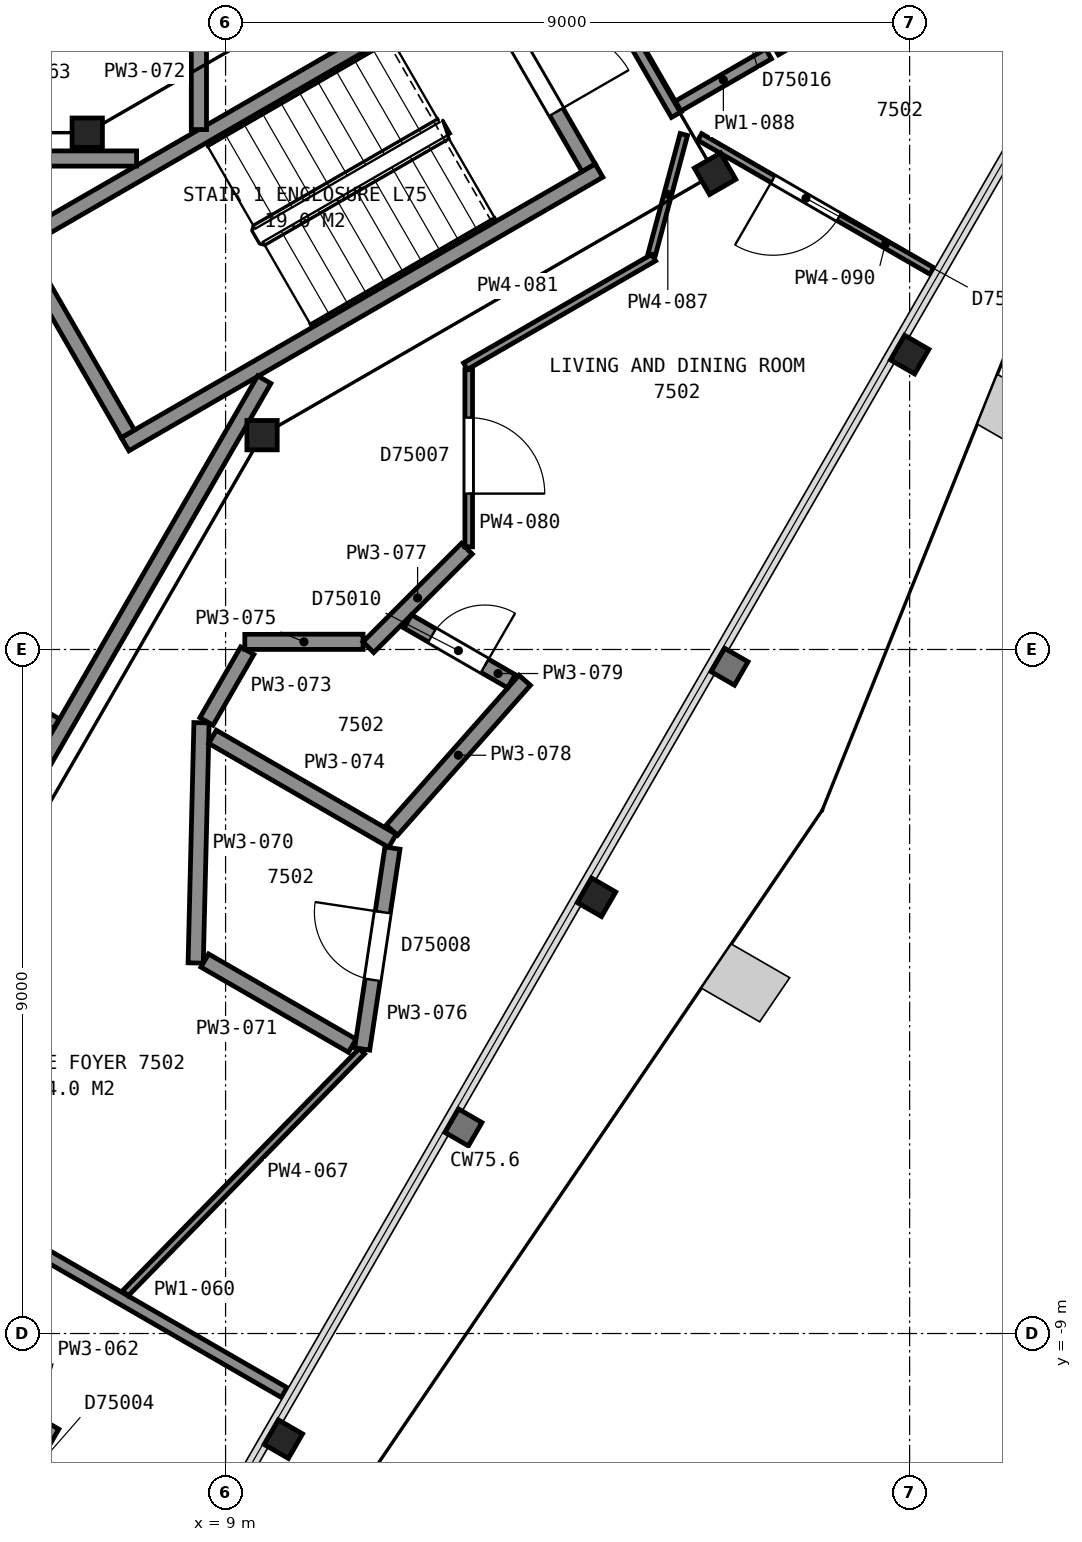
"""IFC4 building model, lengths in metres.
Left out: names, types, materials, properties, quantities, classifications, styles, units other than length and angle.
Written with IfcOpenShell. Run it as: python <this file> out.ifc"""

import sys

from ifc_helpers import new_model, si_unit, direction, frame, frame_2d, origin, origin_2d, place, context, subcontext, project, spatial, rectangle, i_section, extrude, element, fill, save


model = new_model("IFC4")
c1 = context("Model", 3, precision=1e-05, world=origin(), true_north=direction((0.0, 1.0)))
c2 = subcontext(c1, "Body", "Model", "MODEL_VIEW")
j1 = project(units=[si_unit("LENGTHUNIT", "METRE"), si_unit("PLANEANGLEUNIT", "RADIAN")], contexts=[c1])
p1 = place(None, origin())
s1 = spatial("IfcSite", under=j1, at=p1, CompositionType="ELEMENT")
p2 = place(p1, origin())
s2 = spatial("IfcBuilding", under=s1, at=p2, CompositionType="ELEMENT")
p3 = place(p2, frame((0.0, 0.0, 297.3)))
s3 = spatial("IfcBuildingStorey", under=s2, at=p3, CompositionType="ELEMENT", Elevation=297.3)
for number, where, z_axis, x_axis in (
    (1, (9.76, -10.39, 0.0), (0.0, 0.0, 1.0), (-0.5, -0.866, 0.0)),
    (2, (13.88, -3.26, 0.0), (0.0, 0.0, 1.0), (-0.5, -0.866, 0.0)),
    (3, (18.0, 3.88, 0.0), (0.0, 0.0, 1.0), (-0.5, -0.866, 0.0)),
):
    element("IfcColumn", number, at=place(p3, frame(where, z_axis=z_axis, x_axis=x_axis)), inside=s3, PredefinedType="COLUMN", context=c2, shape_type="SweptSolid", body=[
        extrude(i_section(OverallWidth=0.373, OverallDepth=0.368, WebThickness=0.015, FlangeThickness=0.024, FilletRadius=0.015, at=origin_2d()), origin(), (0.0, 0.0, 1.0), 3.7),
    ])
p4 = place(p3, frame((9.48, 2.82, 0.0), z_axis=(0.0, 0.0, 1.0), x_axis=(1.0, 0.0, 0.0)))
e4 = element("IfcColumn", 4, at=p4, inside=s3, PredefinedType="COLUMN", context=c2, shape_type="SweptSolid", body=[
    extrude(i_section(OverallWidth=0.399, OverallDepth=0.386, WebThickness=0.021, FlangeThickness=0.033, FilletRadius=0.015, at=origin_2d()), origin(), (0.0, 0.0, 1.0), 3.7),
])
p5 = place(p3, frame((15.44, 6.26, 0.0), z_axis=(0.0, 0.0, 1.0), x_axis=(0.5, -0.866025403784, 0.0)))
e5 = element("IfcColumn", 5, at=p5, inside=s3, PredefinedType="COLUMN", context=c2, shape_type="SweptSolid", body=[
    extrude(i_section(OverallWidth=0.401, OverallDepth=0.399, WebThickness=0.025, FlangeThickness=0.04, FilletRadius=0.015, at=origin_2d()), origin(), (0.0, 0.0, 1.0), 3.7),
])
p6 = place(p3, frame((7.18, 6.8, 0.0), z_axis=(0.0, 0.0, 1.0), x_axis=(1.0, 0.0, 0.0)))
e6 = element("IfcColumn", 6, at=p6, inside=s3, PredefinedType="COLUMN", context=c2, shape_type="SweptSolid", body=[
    extrude(i_section(OverallWidth=0.399, OverallDepth=0.386, WebThickness=0.021, FlangeThickness=0.033, FilletRadius=0.015, at=origin_2d()), origin(), (0.0, 0.0, 1.0), 3.7),
])
p7 = place(p3, frame((13.777, 6.338, 0.0), z_axis=(0.0, 0.0, 1.0), x_axis=(-0.500049511043, 0.865996816683, 0.0)))
e7 = element("IfcWall", 7, at=p7, inside=s3, PredefinedType="PARTITIONING", context=c2, shape_type="SweptSolid", body=[
    extrude(rectangle(XDim=2.8, YDim=0.2, at=frame_2d((1.4, 0.0))), origin(), (0.0, 0.0, 1.0), 3.45),
])
p8 = place(p7, frame((0.85, 0.0, 0.0)))
e8 = element("IfcOpeningElement", 8, at=p8, cuts=e7, PredefinedType="OPENING", context=c2, shape_type="SweptSolid", body=[
    extrude(rectangle(XDim=1.1, YDim=2.1, at=frame_2d((0.55, 1.05))), frame((0.0, 0.11, 0.0), z_axis=(0.0, -1.0, 0.0), x_axis=(1.0, 0.0, 0.0)), (0.0, 0.0, 1.0), 0.22),
])
for number, where, z_axis, x_axis in (
    (9, (6.178, 5.299, 0.0), (0.0, 0.0, 1.0), (0.866, 0.5, 0.0)),
    (10, (7.678, 2.701, 0.0), (0.0, 0.0, 1.0), (0.866, 0.5, 0.0)),
):
    element("IfcWall", number, at=place(p3, frame(where, z_axis=z_axis, x_axis=x_axis)), inside=s3, PredefinedType="PARTITIONING", context=c2, shape_type="SweptSolid", body=[
        extrude(rectangle(XDim=7.2, YDim=0.2, at=frame_2d((3.6, 0.0))), origin(), (0.0, 0.0, 1.0), 3.45),
    ])
p9 = place(p3, frame((7.715, 2.838, 0.0), z_axis=(0.0, 0.0, 1.0), x_axis=(-0.500049511043, 0.865996816683, 0.0)))
e11 = element("IfcWall", 11, at=p9, inside=s3, PredefinedType="PARTITIONING", context=c2, shape_type="SweptSolid", body=[
    extrude(rectangle(XDim=2.8, YDim=0.2, at=frame_2d((1.4, 0.0))), origin(), (0.0, 0.0, 1.0), 3.45),
])
p10 = place(p3, frame((7.829, 6.46, 0.0), z_axis=(0.0, 0.0, 1.0), x_axis=(-1.0, 0.0, 0.0)))
e12 = element("IfcWall", 12, at=p10, inside=s3, PredefinedType="PARTITIONING", context=c2, shape_type="SweptSolid", body=[
    extrude(rectangle(XDim=15.658, YDim=0.2, at=frame_2d((7.829, 0.0))), origin(), (0.0, 0.0, 1.0), 3.45),
])
p11 = place(p10, frame((12.168, 0.0, 0.0)))
e13 = element("IfcOpeningElement", 13, at=p11, cuts=e12, PredefinedType="OPENING", context=c2, shape_type="SweptSolid", body=[
    extrude(rectangle(XDim=1.2, YDim=2.1, at=frame_2d((0.6, 1.05))), frame((0.0, 0.11, 0.0), z_axis=(0.0, -1.0, 0.0), x_axis=(1.0, 0.0, 0.0)), (0.0, 0.0, 1.0), 0.22),
])
p12 = place(p3, frame((3.828, -6.29, 0.0), z_axis=(0.0, 0.0, 1.0), x_axis=(0.499979739078, 0.866037101117, 0.0)))
e14 = element("IfcWall", 14, at=p12, inside=s3, PredefinedType="PARTITIONING", context=c2, shape_type="SweptSolid", body=[
    extrude(rectangle(XDim=11.363, YDim=0.2, at=frame_2d((5.681, 0.0))), origin(), (0.0, 0.0, 1.0), 3.45),
])
p13 = place(p12, frame((0.55, 0.0, 0.0)))
e15 = element("IfcOpeningElement", 15, at=p13, cuts=e14, PredefinedType="OPENING", context=c2, shape_type="SweptSolid", body=[
    extrude(rectangle(XDim=1.2, YDim=2.1, at=frame_2d((0.6, 1.05))), frame((0.0, 0.11, 0.0), z_axis=(0.0, -1.0, 0.0), x_axis=(1.0, 0.0, 0.0)), (0.0, 0.0, 1.0), 0.22),
])
p14 = place(p3, frame((6.774, -0.978, 0.0), z_axis=(0.0, 0.0, 1.0), x_axis=(-0.866062920605, 0.499935013329, 0.0)))
e16 = element("IfcWall", 16, at=p14, inside=s3, PredefinedType="PARTITIONING", context=c2, shape_type="SweptSolid", body=[
    extrude(rectangle(XDim=2.22, YDim=0.15, at=frame_2d((1.11, 0.0))), origin(), (0.0, 0.0, 1.0), 3.45),
])
p15 = place(p14, frame((0.646, 0.0, 0.0)))
e17 = element("IfcOpeningElement", 17, at=p15, cuts=e16, PredefinedType="OPENING", context=c2, shape_type="SweptSolid", body=[
    extrude(rectangle(XDim=0.9, YDim=2.1, at=frame_2d((0.45, 1.05))), frame((0.0, 0.085, 0.0), z_axis=(0.0, -1.0, 0.0), x_axis=(1.0, 0.0, 0.0)), (0.0, 0.0, 1.0), 0.17),
])
p16 = place(p3, frame((3.682, -8.571, 0.0), z_axis=(0.0, 0.0, 1.0), x_axis=(0.866075604562, -0.499913039621, 0.0)))
e18 = element("IfcWall", 18, at=p16, inside=s3, PredefinedType="PARTITIONING", context=c2, shape_type="SweptSolid", body=[
    extrude(rectangle(XDim=3.549, YDim=0.2, at=frame_2d((1.774, 0.0))), origin(), (0.0, 0.0, 1.0), 2.723),
])
p17 = place(p3, frame((9.772, -9.777, 0.0), z_axis=(0.0, 0.0, 1.0), x_axis=(-0.866083818164, 0.499898809675, 0.0)))
e19 = element("IfcWall", 19, at=p17, inside=s3, PredefinedType="PARTITIONING", context=c2, shape_type="SweptSolid", body=[
    extrude(rectangle(XDim=6.551, YDim=0.15, at=frame_2d((3.275, 0.0))), origin(), (0.0, 0.0, 1.0), 2.723),
])
p18 = place(p17, frame((4.001, 0.0, 0.0)))
e20 = element("IfcOpeningElement", 20, at=p18, cuts=e19, PredefinedType="OPENING", context=c2, shape_type="SweptSolid", body=[
    extrude(rectangle(XDim=1.0, YDim=2.1, at=frame_2d((0.5, 1.05))), frame((0.0, 0.085, 0.0), z_axis=(0.0, -1.0, 0.0), x_axis=(1.0, 0.0, 0.0)), (0.0, 0.0, 1.0), 0.17),
])
p19 = place(p3, frame((7.682, -8.47, 0.0), z_axis=(0.0, 0.0, 1.0), x_axis=(0.698777378461, 0.715339203002, 0.0)))
e21 = element("IfcWall", 21, at=p19, inside=s3, PredefinedType="PARTITIONING", context=c2, shape_type="SweptSolid", body=[
    extrude(rectangle(XDim=4.452, YDim=0.1, at=frame_2d((2.226, 0.0))), origin(), (0.0, 0.0, 1.0), 2.723),
])
p20 = place(p3, frame((8.607, -4.125, 0.0), z_axis=(0.0, 0.0, 1.0), x_axis=(0.024245593124, 0.999706032399, 0.0)))
e22 = element("IfcWall", 22, at=p20, inside=s3, PredefinedType="PARTITIONING", context=c2, shape_type="SweptSolid", body=[
    extrude(rectangle(XDim=3.162, YDim=0.2, at=frame_2d((1.581, 0.0))), origin(), (0.0, 0.0, 1.0), 2.723),
])
p21 = place(p3, frame((8.726, -4.093, 0.0), z_axis=(0.0, 0.0, 1.0), x_axis=(0.866056839033, -0.499945548598, 0.0)))
e23 = element("IfcWall", 23, at=p21, inside=s3, PredefinedType="PARTITIONING", context=c2, shape_type="SweptSolid", body=[
    extrude(rectangle(XDim=2.242, YDim=0.2, at=frame_2d((1.121, 0.0))), origin(), (0.0, 0.0, 1.0), 2.723),
])
p22 = place(p3, frame((8.649, 6.841, 0.0), z_axis=(0.0, 0.0, 1.0), x_axis=(0.0, 1.0, 0.0)))
e24 = element("IfcWall", 24, at=p22, inside=s3, PredefinedType="PARTITIONING", context=c2, shape_type="SweptSolid", body=[
    extrude(rectangle(XDim=1.528, YDim=0.2, at=frame_2d((0.764, 0.0))), origin(), (0.0, 0.0, 1.0), 2.723),
])
p23 = place(p3, frame((8.749, -0.947, 0.0), z_axis=(0.0, 0.0, 1.0), x_axis=(0.499656913366, 0.866223394354, 0.0)))
e25 = element("IfcWall", 25, at=p23, inside=s3, PredefinedType="PARTITIONING", context=c2, shape_type="SweptSolid", body=[
    extrude(rectangle(XDim=1.075, YDim=0.2, at=frame_2d((0.538, 0.0))), origin(), (0.0, 0.0, 1.0), 2.723),
])
p24 = place(p3, frame((8.828, -1.149, 0.0), z_axis=(0.0, 0.0, 1.0), x_axis=(0.865853899269, -0.50029693695, 0.0)))
e26 = element("IfcWall", 26, at=p24, inside=s3, PredefinedType="PARTITIONING", context=c2, shape_type="SweptSolid", body=[
    extrude(rectangle(XDim=2.734, YDim=0.2, at=frame_2d((1.367, 0.0))), origin(), (0.0, 0.0, 1.0), 2.723),
])
p25 = place(p3, frame((9.253, 0.101, 0.0), z_axis=(0.0, 0.0, 1.0), x_axis=(1.0, 0.0, 0.0)))
e27 = element("IfcWall", 27, at=p25, inside=s3, PredefinedType="PARTITIONING", context=c2, shape_type="SweptSolid", body=[
    extrude(rectangle(XDim=1.556, YDim=0.2, at=frame_2d((0.778, 0.0))), origin(), (0.0, 0.0, 1.0), 2.723),
])
p26 = place(p3, frame((10.797, -5.256, 0.0), z_axis=(0.0, 0.0, 1.0), x_axis=(0.148961207986, 0.988843040384, 0.0)))
e28 = element("IfcWall", 28, at=p26, inside=s3, PredefinedType="PARTITIONING", context=c2, shape_type="SweptSolid", body=[
    extrude(rectangle(XDim=2.673, YDim=0.2, at=frame_2d((1.336, 0.0))), origin(), (0.0, 0.0, 1.0), 2.723),
])
p27 = place(p26, frame((0.92, 0.0, 0.0)))
e29 = element("IfcOpeningElement", 29, at=p27, cuts=e28, PredefinedType="OPENING", context=c2, shape_type="SweptSolid", body=[
    extrude(rectangle(XDim=0.9, YDim=2.1, at=frame_2d((0.45, 1.05))), frame((0.0, 0.11, 0.0), z_axis=(0.0, -1.0, 0.0), x_axis=(1.0, 0.0, 0.0)), (0.0, 0.0, 1.0), 0.22),
])
p28 = place(p3, frame((10.878, 0.03, 0.0), z_axis=(0.0, 0.0, 1.0), x_axis=(0.707173379423, 0.707040176677, 0.0)))
e30 = element("IfcWall", 30, at=p28, inside=s3, PredefinedType="PARTITIONING", context=c2, shape_type="SweptSolid", body=[
    extrude(rectangle(XDim=1.833, YDim=0.2, at=frame_2d((0.917, 0.0))), origin(), (0.0, 0.0, 1.0), 2.723),
])
p29 = place(p3, frame((11.188, -2.377, 0.0), z_axis=(0.0, 0.0, 1.0), x_axis=(0.663045631266, 0.748578981043, 0.0)))
e31 = element("IfcWall", 31, at=p29, inside=s3, PredefinedType="PARTITIONING", context=c2, shape_type="SweptSolid", body=[
    extrude(rectangle(XDim=2.635, YDim=0.2, at=frame_2d((1.317, 0.0))), origin(), (0.0, 0.0, 1.0), 2.723),
])
p30 = place(p3, frame((12.761, -0.417, 0.0), z_axis=(0.0, 0.0, 1.0), x_axis=(-0.866030680601, 0.499990860175, 0.0)))
e32 = element("IfcWall", 32, at=p30, inside=s3, PredefinedType="PARTITIONING", context=c2, shape_type="SweptSolid", body=[
    extrude(rectangle(XDim=1.575, YDim=0.2, at=frame_2d((0.787, 0.0))), origin(), (0.0, 0.0, 1.0), 2.723),
])
p31 = place(p30, frame((0.405, 0.0, 0.0)))
e33 = element("IfcOpeningElement", 33, at=p31, cuts=e32, PredefinedType="OPENING", context=c2, shape_type="SweptSolid", body=[
    extrude(rectangle(XDim=0.8, YDim=2.1, at=frame_2d((0.4, 1.05))), frame((0.0, 0.11, 0.0), z_axis=(0.0, -1.0, 0.0), x_axis=(1.0, 0.0, 0.0)), (0.0, 0.0, 1.0), 0.22),
])
p32 = place(p3, frame((12.199, 3.682, 0.0), z_axis=(0.0, 0.0, 1.0), x_axis=(0.0, -1.0, 0.0)))
e34 = element("IfcWall", 34, at=p32, inside=s3, PredefinedType="PARTITIONING", context=c2, shape_type="SweptSolid", body=[
    extrude(rectangle(XDim=2.331, YDim=0.1, at=frame_2d((1.166, 0.0))), origin(), (0.0, 0.0, 1.0), 2.723),
])
p33 = place(p32, frame((0.631, 0.0, 0.0)))
e35 = element("IfcOpeningElement", 35, at=p33, cuts=e34, PredefinedType="OPENING", context=c2, shape_type="SweptSolid", body=[
    extrude(rectangle(XDim=1.0, YDim=2.1, at=frame_2d((0.5, 1.05))), frame((0.0, 0.06, 0.0), z_axis=(0.0, -1.0, 0.0), x_axis=(1.0, 0.0, 0.0)), (0.0, 0.0, 1.0), 0.12),
])
p34 = place(p3, frame((12.156, 3.727, 0.0), z_axis=(0.0, 0.0, 1.0), x_axis=(0.866012137121, 0.500022977831, 0.0)))
e36 = element("IfcWall", 36, at=p34, inside=s3, PredefinedType="PARTITIONING", context=c2, shape_type="SweptSolid", body=[
    extrude(rectangle(XDim=2.86, YDim=0.1, at=frame_2d((1.43, 0.0))), origin(), (0.0, 0.0, 1.0), 2.723),
])
p35 = place(p3, frame((13.759, 9.069, 0.0), z_axis=(0.0, 0.0, 1.0), x_axis=(0.500046885369, -0.865998332812, 0.0)))
e37 = element("IfcWall", 37, at=p35, inside=s3, PredefinedType="PARTITIONING", context=c2, shape_type="SweptSolid", body=[
    extrude(rectangle(XDim=2.345, YDim=0.15, at=frame_2d((1.172, 0.0))), origin(), (0.0, 0.0, 1.0), 2.723),
])
p36 = place(p3, frame((14.607, 5.2, 0.0), z_axis=(0.0, 0.0, 1.0), x_axis=(0.258519214507, 0.966006115783, 0.0)))
e38 = element("IfcWall", 38, at=p36, inside=s3, PredefinedType="PARTITIONING", context=c2, shape_type="SweptSolid", body=[
    extrude(rectangle(XDim=1.632, YDim=0.1, at=frame_2d((0.816, 0.0))), origin(), (0.0, 0.0, 1.0), 2.723),
])
p37 = place(p3, frame((14.954, 7.149, 0.0), z_axis=(0.0, 0.0, 1.0), x_axis=(0.865960792519, 0.5001118933, 0.0)))
e39 = element("IfcWall", 39, at=p37, inside=s3, PredefinedType="PARTITIONING", context=c2, shape_type="SweptSolid", body=[
    extrude(rectangle(XDim=1.375, YDim=0.15, at=frame_2d((0.688, 0.0))), origin(), (0.0, 0.0, 1.0), 2.723),
])
p38 = place(p3, frame((15.238, 6.744, 0.0), z_axis=(0.0, 0.0, 1.0), x_axis=(0.866104892567, -0.49986229611, 0.0)))
e40 = element("IfcWall", 40, at=p38, inside=s3, PredefinedType="PARTITIONING", context=c2, shape_type="SweptSolid", body=[
    extrude(rectangle(XDim=3.526, YDim=0.1, at=frame_2d((1.763, 0.0))), origin(), (0.0, 0.0, 1.0), 2.723),
])
p39 = place(p38, frame((1.114, 0.0, 0.0)))
e41 = element("IfcOpeningElement", 41, at=p39, cuts=e40, PredefinedType="OPENING", context=c2, shape_type="SweptSolid", body=[
    extrude(rectangle(XDim=1.0, YDim=2.1, at=frame_2d((0.5, 1.05))), frame((0.0, 0.06, 0.0), z_axis=(0.0, -1.0, 0.0), x_axis=(1.0, 0.0, 0.0)), (0.0, 0.0, 1.0), 0.12),
])
p40 = place(p3, frame((16.236, 7.889, 0.0), z_axis=(0.0, 0.0, 1.0), x_axis=(0.865995456094, 0.500051867335, 0.0)))
e42 = element("IfcWall", 42, at=p40, inside=s3, PredefinedType="PARTITIONING", context=c2, shape_type="SweptSolid", body=[
    extrude(rectangle(XDim=6.415, YDim=0.15, at=frame_2d((3.208, 0.0))), origin(), (0.0, 0.0, 1.0), 2.723),
])
p41 = place(p8, origin())
e43 = element("IfcDoor", 43, at=p41, inside=s3, OperationType="SINGLE_SWING_LEFT", PredefinedType="DOOR", context=c2, shape_type="SweptSolid", body=[
    extrude(rectangle(XDim=1.1, YDim=2.1, at=frame_2d((0.55, 1.05))), frame((0.0, 0.025, 0.0), z_axis=(0.0, -1.0, 0.0), x_axis=(1.0, 0.0, 0.0)), (0.0, 0.0, 1.0), 0.05),
])
fill(e8, e43)
p42 = place(p27, origin())
e44 = element("IfcDoor", 44, at=p42, inside=s3, OperationType="SINGLE_SWING_RIGHT", PredefinedType="DOOR", context=c2, shape_type="SweptSolid", body=[
    extrude(rectangle(XDim=0.9, YDim=2.1, at=frame_2d((0.45, 1.05))), frame((0.0, 0.025, 0.0), z_axis=(0.0, -1.0, 0.0), x_axis=(1.0, 0.0, 0.0)), (0.0, 0.0, 1.0), 0.05),
])
fill(e29, e44)
p43 = place(p31, origin())
e45 = element("IfcDoor", 45, at=p43, inside=s3, OperationType="SINGLE_SWING_LEFT", PredefinedType="DOOR", context=c2, shape_type="SweptSolid", body=[
    extrude(rectangle(XDim=0.8, YDim=2.1, at=frame_2d((0.4, 1.05))), frame((0.0, 0.025, 0.0), z_axis=(0.0, -1.0, 0.0), x_axis=(1.0, 0.0, 0.0)), (0.0, 0.0, 1.0), 0.05),
])
fill(e33, e45)
p44 = place(p33, origin())
e46 = element("IfcDoor", 46, at=p44, inside=s3, OperationType="SINGLE_SWING_RIGHT", PredefinedType="DOOR", context=c2, shape_type="SweptSolid", body=[
    extrude(rectangle(XDim=1.0, YDim=2.1, at=frame_2d((0.5, 1.05))), frame((0.0, 0.025, 0.0), z_axis=(0.0, -1.0, 0.0), x_axis=(1.0, 0.0, 0.0)), (0.0, 0.0, 1.0), 0.05),
])
fill(e35, e46)
p45 = place(p39, origin())
e47 = element("IfcDoor", 47, at=p45, inside=s3, OperationType="SINGLE_SWING_LEFT", PredefinedType="DOOR", context=c2, shape_type="SweptSolid", body=[
    extrude(rectangle(XDim=1.0, YDim=2.1, at=frame_2d((0.5, 1.05))), frame((0.0, 0.025, 0.0), z_axis=(0.0, -1.0, 0.0), x_axis=(1.0, 0.0, 0.0)), (0.0, 0.0, 1.0), 0.05),
])
fill(e41, e47)
save(model, sys.argv[1])
